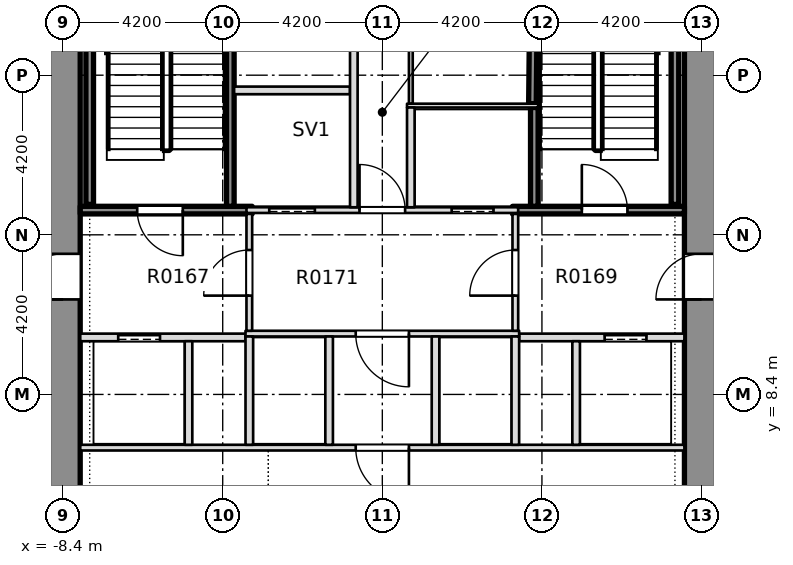
"""IFC4 building model, lengths in metres.
Left out: names, types, materials, properties, quantities, classifications, styles, units other than length and angle.
Written with IfcOpenShell. Run it as: python <this file> out.ifc"""

import sys

from ifc_helpers import new_model, si_unit, direction, frame, frame_2d, origin, place, context, subcontext, project, spatial, rectangle, extrude, element, fill, save


model = new_model("IFC4")
c1 = context("Model", 3, precision=1e-05, world=origin(), true_north=direction((0.0, 1.0)))
c2 = subcontext(c1, "Body", "Model", "MODEL_VIEW")
j1 = project(units=[si_unit("LENGTHUNIT", "METRE"), si_unit("PLANEANGLEUNIT", "RADIAN")], contexts=[c1])
p1 = place(None, origin())
s1 = spatial("IfcSite", under=j1, at=p1, CompositionType="ELEMENT")
p2 = place(p1, origin())
s2 = spatial("IfcBuilding", under=s1, at=p2, CompositionType="ELEMENT")
p3 = place(p2, frame((0.0, 0.0, 7.5)))
s3 = spatial("IfcBuildingStorey", under=s2, at=p3, CompositionType="ELEMENT", Elevation=7.5)
p4 = place(p3, frame((-8.4, -7.5, -0.4), z_axis=(0.0, 0.0, 1.0), x_axis=(0.0, 1.0, 0.0)))
e1 = element("IfcWall", 1, at=p4, inside=s3, PredefinedType="SHEAR", context=c2, shape_type="SweptSolid", body=[
    extrude(rectangle(XDim=28.35, YDim=0.9, at=frame_2d((14.175, 0.0))), origin(), (0.0, 0.0, 1.0), 5.0),
])
p5 = place(p4, frame((18.4, 0.0, 0.4)))
e2 = element("IfcOpeningElement", 2, at=p5, cuts=e1, PredefinedType="OPENING", context=c2, shape_type="SweptSolid", body=[
    extrude(rectangle(XDim=1.2, YDim=2.1, at=frame_2d((0.6, 1.05))), frame((0.0, 0.46, 0.0), z_axis=(0.0, -1.0, 0.0), x_axis=(1.0, 0.0, 0.0)), (0.0, 0.0, 1.0), 0.92),
])
p6 = place(p3, frame((8.4, -7.5, -0.4), z_axis=(0.0, 0.0, 1.0), x_axis=(0.0, 1.0, 0.0)))
e3 = element("IfcWall", 3, at=p6, inside=s3, PredefinedType="SHEAR", context=c2, shape_type="SweptSolid", body=[
    extrude(rectangle(XDim=28.35, YDim=0.9, at=frame_2d((14.175, 0.0))), origin(), (0.0, 0.0, 1.0), 5.0),
])
p7 = place(p6, frame((18.4, 0.0, 0.4)))
e4 = element("IfcOpeningElement", 4, at=p7, cuts=e3, PredefinedType="OPENING", context=c2, shape_type="SweptSolid", body=[
    extrude(rectangle(XDim=1.2, YDim=2.1, at=frame_2d((0.6, 1.05))), frame((0.0, 0.46, 0.0), z_axis=(0.0, -1.0, 0.0), x_axis=(1.0, 0.0, 0.0)), (0.0, 0.0, 1.0), 0.92),
])
p8 = place(p3, frame((-7.949, 7.0, 0.0), z_axis=(0.0, 0.0, 1.0), x_axis=(1.0, 0.0, 0.0)))
e5 = element("IfcWall", 5, at=p8, inside=s3, PredefinedType="PARTITIONING", context=c2, shape_type="SweptSolid", body=[
    extrude(rectangle(XDim=15.898, YDim=0.15, at=frame_2d((7.949, 0.0))), origin(), (0.0, 0.0, 1.0), 4.6),
])
p9 = place(p8, frame((7.249, 0.0, 0.0)))
e6 = element("IfcOpeningElement", 6, at=p9, cuts=e5, PredefinedType="OPENING", context=c2, shape_type="SweptSolid", body=[
    extrude(rectangle(XDim=1.4, YDim=2.1, at=frame_2d((0.7, 1.05))), frame((0.0, 0.085, 0.0), z_axis=(0.0, -1.0, 0.0), x_axis=(1.0, 0.0, 0.0)), (0.0, 0.0, 1.0), 0.17),
])
p10 = place(p3, frame((-7.949, 9.9, 0.0), z_axis=(0.0, 0.0, 1.0), x_axis=(1.0, 0.0, 0.0)))
e7 = element("IfcWall", 7, at=p10, inside=s3, PredefinedType="PARTITIONING", context=c2, shape_type="SweptSolid", body=[
    extrude(rectangle(XDim=4.349, YDim=0.2, at=frame_2d((2.174, 0.0))), origin(), (0.0, 0.0, 1.0), 4.6),
])
p11 = place(p10, frame((0.999, 0.0, 0.0)))
e8 = element("IfcOpeningElement", 8, at=p11, cuts=e7, PredefinedType="OPENING", context=c2, shape_type="SweptSolid", body=[
    extrude(rectangle(XDim=1.1, YDim=2.1, at=frame_2d((0.55, 1.05))), frame((0.0, 0.11, 0.0), z_axis=(0.0, -1.0, 0.0), x_axis=(1.0, 0.0, 0.0)), (0.0, 0.0, 1.0), 0.22),
])
p12 = place(p3, frame((3.6, 9.9, 0.0), z_axis=(0.0, 0.0, 1.0), x_axis=(1.0, 0.0, 0.0)))
e9 = element("IfcWall", 9, at=p12, inside=s3, PredefinedType="PARTITIONING", context=c2, shape_type="SweptSolid", body=[
    extrude(rectangle(XDim=4.349, YDim=0.2, at=frame_2d((2.174, 0.0))), origin(), (0.0, 0.0, 1.0), 4.6),
])
p13 = place(p12, frame((2.25, 0.0, 0.0)))
e10 = element("IfcOpeningElement", 10, at=p13, cuts=e9, PredefinedType="OPENING", context=c2, shape_type="SweptSolid", body=[
    extrude(rectangle(XDim=1.1, YDim=2.1, at=frame_2d((0.55, 1.05))), frame((0.0, 0.11, 0.0), z_axis=(0.0, -1.0, 0.0), x_axis=(1.0, 0.0, 0.0)), (0.0, 0.0, 1.0), 0.22),
])
p14 = place(p3, frame((-3.6, 10.0, 0.0), z_axis=(0.0, 0.0, 1.0), x_axis=(1.0, 0.0, 0.0)))
e11 = element("IfcWall", 11, at=p14, inside=s3, PredefinedType="PARTITIONING", context=c2, shape_type="SweptSolid", body=[
    extrude(rectangle(XDim=7.2, YDim=0.15, at=frame_2d((3.6, 0.0))), origin(), (0.0, 0.0, 1.0), 4.6),
])
p15 = place(p14, frame((2.9, 0.0, 0.0)))
e12 = element("IfcOpeningElement", 12, at=p15, cuts=e11, PredefinedType="OPENING", context=c2, shape_type="SweptSolid", body=[
    extrude(rectangle(XDim=1.4, YDim=2.1, at=frame_2d((0.7, 1.05))), frame((0.0, 0.085, 0.0), z_axis=(0.0, -1.0, 0.0), x_axis=(1.0, 0.0, 0.0)), (0.0, 0.0, 1.0), 0.17),
])
p16 = place(p3, frame((-7.949, 13.25, 0.0), z_axis=(0.0, 0.0, 1.0), x_axis=(1.0, 0.0, 0.0)))
e13 = element("IfcWall", 13, at=p16, inside=s3, PredefinedType="SOLIDWALL", context=c2, shape_type="SweptSolid", body=[
    extrude(rectangle(XDim=4.524, YDim=0.2, at=frame_2d((2.262, 0.0))), origin(), (0.0, 0.0, 1.0), 4.6),
])
p17 = place(p16, frame((1.499, 0.0, 0.0)))
e14 = element("IfcOpeningElement", 14, at=p17, cuts=e13, PredefinedType="OPENING", context=c2, shape_type="SweptSolid", body=[
    extrude(rectangle(XDim=1.2, YDim=2.1, at=frame_2d((0.6, 1.05))), frame((0.0, 0.11, 0.0), z_axis=(0.0, -1.0, 0.0), x_axis=(1.0, 0.0, 0.0)), (0.0, 0.0, 1.0), 0.22),
])
p18 = place(p3, frame((-3.575, 13.25, 0.0), z_axis=(0.0, 0.0, 1.0), x_axis=(1.0, 0.0, 0.0)))
e15 = element("IfcWall", 15, at=p18, inside=s3, PredefinedType="PARTITIONING", context=c2, shape_type="SweptSolid", body=[
    extrude(rectangle(XDim=7.15, YDim=0.15, at=frame_2d((3.575, 0.0))), origin(), (0.0, 0.0, 1.0), 4.6),
])
p19 = place(p18, frame((0.6, 0.0, 0.0)))
e16 = element("IfcOpeningElement", 16, at=p19, cuts=e15, PredefinedType="OPENING", context=c2, shape_type="SweptSolid", body=[
    extrude(rectangle(XDim=1.2, YDim=2.1, at=frame_2d((0.6, 1.05))), frame((0.0, 0.085, 0.0), z_axis=(0.0, -1.0, 0.0), x_axis=(1.0, 0.0, 0.0)), (0.0, 0.0, 1.0), 0.17),
])
p20 = place(p18, frame((5.4, 0.0, 0.0)))
e17 = element("IfcOpeningElement", 17, at=p20, cuts=e15, PredefinedType="OPENING", context=c2, shape_type="SweptSolid", body=[
    extrude(rectangle(XDim=1.1, YDim=2.1, at=frame_2d((0.55, 1.05))), frame((0.0, 0.085, 0.0), z_axis=(0.0, -1.0, 0.0), x_axis=(1.0, 0.0, 0.0)), (0.0, 0.0, 1.0), 0.17),
])
p21 = place(p18, frame((2.975, 0.0, 0.0)))
e18 = element("IfcOpeningElement", 18, at=p21, cuts=e15, PredefinedType="OPENING", context=c2, shape_type="SweptSolid", body=[
    extrude(rectangle(XDim=1.2, YDim=2.1, at=frame_2d((0.6, 1.05))), frame((0.0, 0.085, 0.0), z_axis=(0.0, -1.0, 0.0), x_axis=(1.0, 0.0, 0.0)), (0.0, 0.0, 1.0), 0.17),
])
p22 = place(p3, frame((3.425, 13.25, 0.0), z_axis=(0.0, 0.0, 1.0), x_axis=(1.0, 0.0, 0.0)))
e19 = element("IfcWall", 19, at=p22, inside=s3, PredefinedType="SOLIDWALL", context=c2, shape_type="SweptSolid", body=[
    extrude(rectangle(XDim=4.524, YDim=0.2, at=frame_2d((2.262, 0.0))), origin(), (0.0, 0.0, 1.0), 4.6),
])
p23 = place(p22, frame((1.825, 0.0, 0.0)))
e20 = element("IfcOpeningElement", 20, at=p23, cuts=e19, PredefinedType="OPENING", context=c2, shape_type="SweptSolid", body=[
    extrude(rectangle(XDim=1.2, YDim=2.1, at=frame_2d((0.6, 1.05))), frame((0.0, 0.11, 0.0), z_axis=(0.0, -1.0, 0.0), x_axis=(1.0, 0.0, 0.0)), (0.0, 0.0, 1.0), 0.22),
])
p24 = place(p3, frame((0.65, 16.0, 0.0), z_axis=(0.0, 0.0, 1.0), x_axis=(1.0, 0.0, 0.0)))
e21 = element("IfcWall", 21, at=p24, inside=s3, PredefinedType="PARTITIONING", context=c2, shape_type="SweptSolid", body=[
    extrude(rectangle(XDim=3.45, YDim=0.1, at=frame_2d((1.725, 0.0))), origin(), (0.0, 0.0, 1.0), 4.6),
])
p25 = place(p3, frame((-3.9, 16.4, 0.0), z_axis=(0.0, 0.0, 1.0), x_axis=(1.0, 0.0, 0.0)))
e22 = element("IfcWall", 22, at=p25, inside=s3, PredefinedType="PARTITIONING", context=c2, shape_type="SweptSolid", body=[
    extrude(rectangle(XDim=3.05, YDim=0.2, at=frame_2d((1.525, 0.0))), origin(), (0.0, 0.0, 1.0), 4.6),
])
p26 = place(p3, frame((-5.1, 7.075, 0.0), z_axis=(0.0, 0.0, 1.0), x_axis=(0.0, 1.0, 0.0)))
e23 = element("IfcWall", 23, at=p26, inside=s3, PredefinedType="PARTITIONING", context=c2, shape_type="SweptSolid", body=[
    extrude(rectangle(XDim=2.725, YDim=0.2, at=frame_2d((1.363, 0.0))), origin(), (0.0, 0.0, 1.0), 4.6),
])
p27 = place(p3, frame((-4.0, 13.35, 0.0), z_axis=(0.0, 0.0, 1.0), x_axis=(0.0, 1.0, 0.0)))
e24 = element("IfcWall", 24, at=p27, inside=s3, PredefinedType="SOLIDWALL", context=c2, shape_type="SweptSolid", body=[
    extrude(rectangle(XDim=7.499, YDim=0.2, at=frame_2d((3.75, 0.0))), origin(), (0.0, 0.0, 1.0), 4.6),
])
p28 = place(p3, frame((-3.5, 7.075, 0.0), z_axis=(0.0, 0.0, 1.0), x_axis=(0.0, 1.0, 0.0)))
e25 = element("IfcWall", 25, at=p28, inside=s3, PredefinedType="PARTITIONING", context=c2, shape_type="SweptSolid", body=[
    extrude(rectangle(XDim=2.85, YDim=0.2, at=frame_2d((1.425, 0.0))), origin(), (0.0, 0.0, 1.0), 4.6),
])
p29 = place(p3, frame((-3.5, 10.075, 0.0), z_axis=(0.0, 0.0, 1.0), x_axis=(0.0, 1.0, 0.0)))
e26 = element("IfcWall", 26, at=p29, inside=s3, PredefinedType="PARTITIONING", context=c2, shape_type="SweptSolid", body=[
    extrude(rectangle(XDim=3.075, YDim=0.15, at=frame_2d((1.538, 0.0))), origin(), (0.0, 0.0, 1.0), 4.6),
])
p30 = place(p29, frame((0.925, 0.0, 0.0)))
e27 = element("IfcOpeningElement", 27, at=p30, cuts=e26, PredefinedType="OPENING", context=c2, shape_type="SweptSolid", body=[
    extrude(rectangle(XDim=1.2, YDim=2.1, at=frame_2d((0.6, 1.05))), frame((0.0, 0.085, 0.0), z_axis=(0.0, -1.0, 0.0), x_axis=(1.0, 0.0, 0.0)), (0.0, 0.0, 1.0), 0.17),
])
p31 = place(p3, frame((-1.4, 7.075, 0.0), z_axis=(0.0, 0.0, 1.0), x_axis=(0.0, 1.0, 0.0)))
e28 = element("IfcWall", 28, at=p31, inside=s3, PredefinedType="PARTITIONING", context=c2, shape_type="SweptSolid", body=[
    extrude(rectangle(XDim=2.85, YDim=0.2, at=frame_2d((1.425, 0.0))), origin(), (0.0, 0.0, 1.0), 4.6),
])
p32 = place(p3, frame((-0.75, 13.325, 0.0), z_axis=(0.0, 0.0, 1.0), x_axis=(0.0, 1.0, 0.0)))
e29 = element("IfcWall", 29, at=p32, inside=s3, PredefinedType="PARTITIONING", context=c2, shape_type="SweptSolid", body=[
    extrude(rectangle(XDim=7.524, YDim=0.2, at=frame_2d((3.762, 0.0))), origin(), (0.0, 0.0, 1.0), 4.6),
])
p33 = place(p32, frame((4.8, 0.0, 0.0)))
e30 = element("IfcOpeningElement", 30, at=p33, cuts=e29, PredefinedType="OPENING", context=c2, shape_type="SweptSolid", body=[
    extrude(rectangle(XDim=0.95, YDim=2.1, at=frame_2d((0.475, 1.05))), frame((0.0, 0.11, 0.0), z_axis=(0.0, -1.0, 0.0), x_axis=(1.0, 0.0, 0.0)), (0.0, 0.0, 1.0), 0.22),
])
p34 = place(p3, frame((0.75, 13.325, 0.0), z_axis=(0.0, 0.0, 1.0), x_axis=(0.0, 1.0, 0.0)))
e31 = element("IfcWall", 31, at=p34, inside=s3, PredefinedType="PARTITIONING", context=c2, shape_type="SweptSolid", body=[
    extrude(rectangle(XDim=2.625, YDim=0.2, at=frame_2d((1.312, 0.0))), origin(), (0.0, 0.0, 1.0), 4.6),
])
p35 = place(p3, frame((0.75, 16.05, 0.0), z_axis=(0.0, 0.0, 1.0), x_axis=(0.0, 1.0, 0.0)))
e32 = element("IfcWall", 32, at=p35, inside=s3, PredefinedType="PARTITIONING", context=c2, shape_type="SweptSolid", body=[
    extrude(rectangle(XDim=4.799, YDim=0.1, at=frame_2d((2.399, 0.0))), origin(), (0.0, 0.0, 1.0), 4.6),
])
p36 = place(p35, frame((1.875, 0.0, 0.0)))
e33 = element("IfcOpeningElement", 33, at=p36, cuts=e32, PredefinedType="OPENING", context=c2, shape_type="SweptSolid", body=[
    extrude(rectangle(XDim=0.95, YDim=2.1, at=frame_2d((0.475, 1.05))), frame((0.0, 0.06, 0.0), z_axis=(0.0, -1.0, 0.0), x_axis=(1.0, 0.0, 0.0)), (0.0, 0.0, 1.0), 0.12),
])
for number, where, z_axis, x_axis in (
    (34, (1.4, 7.075, 0.0), (0.0, 0.0, 1.0), (0.0, 1.0, 0.0)),
    (35, (3.5, 7.075, 0.0), (0.0, 0.0, 1.0), (0.0, 1.0, 0.0)),
):
    element("IfcWall", number, at=place(p3, frame(where, z_axis=z_axis, x_axis=x_axis)), inside=s3, PredefinedType="PARTITIONING", context=c2, shape_type="SweptSolid", body=[
        extrude(rectangle(XDim=2.85, YDim=0.2, at=frame_2d((1.425, 0.0))), origin(), (0.0, 0.0, 1.0), 4.6),
    ])
p37 = place(p3, frame((3.5, 10.075, 0.0), z_axis=(0.0, 0.0, 1.0), x_axis=(0.0, 1.0, 0.0)))
e36 = element("IfcWall", 36, at=p37, inside=s3, PredefinedType="PARTITIONING", context=c2, shape_type="SweptSolid", body=[
    extrude(rectangle(XDim=3.075, YDim=0.15, at=frame_2d((1.538, 0.0))), origin(), (0.0, 0.0, 1.0), 4.6),
])
p38 = place(p37, frame((0.925, 0.0, 0.0)))
e37 = element("IfcOpeningElement", 37, at=p38, cuts=e36, PredefinedType="OPENING", context=c2, shape_type="SweptSolid", body=[
    extrude(rectangle(XDim=1.2, YDim=2.1, at=frame_2d((0.6, 1.05))), frame((0.0, 0.085, 0.0), z_axis=(0.0, -1.0, 0.0), x_axis=(1.0, 0.0, 0.0)), (0.0, 0.0, 1.0), 0.17),
])
p39 = place(p3, frame((4.0, 13.35, 0.0), z_axis=(0.0, 0.0, 1.0), x_axis=(0.0, 1.0, 0.0)))
e38 = element("IfcWall", 38, at=p39, inside=s3, PredefinedType="SOLIDWALL", context=c2, shape_type="SweptSolid", body=[
    extrude(rectangle(XDim=2.6, YDim=0.2, at=frame_2d((1.3, 0.0))), origin(), (0.0, 0.0, 1.0), 4.6),
])
p40 = place(p3, frame((3.95, 16.05, 0.0), z_axis=(0.0, 0.0, 1.0), x_axis=(0.010538176883, 0.999944471872, 0.0)))
e39 = element("IfcWall", 39, at=p40, inside=s3, PredefinedType="SOLIDWALL", context=c2, shape_type="SweptSolid", body=[
    extrude(rectangle(XDim=4.749, YDim=0.2, at=frame_2d((2.375, 0.0))), origin(), (0.0, 0.0, 1.0), 4.6),
])
p41 = place(p3, frame((5.1, 7.075, 0.0), z_axis=(0.0, 0.0, 1.0), x_axis=(0.0, 1.0, 0.0)))
e40 = element("IfcWall", 40, at=p41, inside=s3, PredefinedType="PARTITIONING", context=c2, shape_type="SweptSolid", body=[
    extrude(rectangle(XDim=2.725, YDim=0.2, at=frame_2d((1.363, 0.0))), origin(), (0.0, 0.0, 1.0), 4.6),
])
for number, where, z_axis, x_axis in (
    (41, (-7.7, 13.4, 0.0), (0.0, 0.0, 1.0), (0.0, 1.0, 0.0)),
    (42, (7.7, 13.4, 0.0), (0.0, 0.0, 1.0), (0.0, 1.0, 0.0)),
):
    element("IfcWall", number, at=place(p3, frame(where, z_axis=z_axis, x_axis=x_axis)), inside=s3, PredefinedType="SOLIDWALL", context=c2, shape_type="SweptSolid", body=[
        extrude(rectangle(XDim=7.4, YDim=0.2, at=frame_2d((3.7, 0.0))), origin(), (0.0, 0.0, 1.0), 4.6),
    ])
p42 = place(p17, origin())
e43 = element("IfcDoor", 43, at=p42, inside=s3, OperationType="SINGLE_SWING_LEFT", PredefinedType="DOOR", context=c2, shape_type="SweptSolid", body=[
    extrude(rectangle(XDim=1.2, YDim=2.1, at=frame_2d((0.6, 1.05))), frame((0.0, 0.025, 0.0), z_axis=(0.0, -1.0, 0.0), x_axis=(1.0, 0.0, 0.0)), (0.0, 0.0, 1.0), 0.05),
])
fill(e14, e43)
p43 = place(p11, origin())
e44 = element("IfcDoor", 44, at=p43, inside=s3, OperationType="SLIDING_TO_RIGHT", PredefinedType="DOOR", context=c2, shape_type="SweptSolid", body=[
    extrude(rectangle(XDim=1.1, YDim=2.1, at=frame_2d((0.55, 1.05))), frame((0.0, 0.025, 0.0), z_axis=(0.0, -1.0, 0.0), x_axis=(1.0, 0.0, 0.0)), (0.0, 0.0, 1.0), 0.05),
])
fill(e8, e44)
p44 = place(p23, origin())
e45 = element("IfcDoor", 45, at=p44, inside=s3, OperationType="SINGLE_SWING_RIGHT", PredefinedType="DOOR", context=c2, shape_type="SweptSolid", body=[
    extrude(rectangle(XDim=1.2, YDim=2.1, at=frame_2d((0.6, 1.05))), frame((0.0, 0.025, 0.0), z_axis=(0.0, -1.0, 0.0), x_axis=(1.0, 0.0, 0.0)), (0.0, 0.0, 1.0), 0.05),
])
fill(e20, e45)
p45 = place(p13, origin())
e46 = element("IfcDoor", 46, at=p45, inside=s3, OperationType="SLIDING_TO_LEFT", PredefinedType="DOOR", context=c2, shape_type="SweptSolid", body=[
    extrude(rectangle(XDim=1.1, YDim=2.1, at=frame_2d((0.55, 1.05))), frame((0.0, 0.025, 0.0), z_axis=(0.0, -1.0, 0.0), x_axis=(1.0, 0.0, 0.0)), (0.0, 0.0, 1.0), 0.05),
])
fill(e10, e46)
p46 = place(p9, origin())
e47 = element("IfcDoor", 47, at=p46, inside=s3, OperationType="SINGLE_SWING_RIGHT", PredefinedType="DOOR", context=c2, shape_type="SweptSolid", body=[
    extrude(rectangle(XDim=1.4, YDim=2.1, at=frame_2d((0.7, 1.05))), frame((0.0, 0.025, 0.0), z_axis=(0.0, -1.0, 0.0), x_axis=(1.0, 0.0, 0.0)), (0.0, 0.0, 1.0), 0.05),
])
fill(e6, e47)
p47 = place(p15, origin())
e48 = element("IfcDoor", 48, at=p47, inside=s3, OperationType="SINGLE_SWING_RIGHT", PredefinedType="DOOR", context=c2, shape_type="SweptSolid", body=[
    extrude(rectangle(XDim=1.4, YDim=2.1, at=frame_2d((0.7, 1.05))), frame((0.0, 0.025, 0.0), z_axis=(0.0, -1.0, 0.0), x_axis=(1.0, 0.0, 0.0)), (0.0, 0.0, 1.0), 0.05),
])
fill(e12, e48)
p48 = place(p19, origin())
e49 = element("IfcDoor", 49, at=p48, inside=s3, OperationType="SLIDING_TO_RIGHT", PredefinedType="DOOR", context=c2, shape_type="SweptSolid", body=[
    extrude(rectangle(XDim=1.2, YDim=2.1, at=frame_2d((0.6, 1.05))), frame((0.0, 0.025, 0.0), z_axis=(0.0, -1.0, 0.0), x_axis=(1.0, 0.0, 0.0)), (0.0, 0.0, 1.0), 0.05),
])
fill(e16, e49)
p49 = place(p20, origin())
e50 = element("IfcDoor", 50, at=p49, inside=s3, OperationType="SLIDING_TO_LEFT", PredefinedType="DOOR", context=c2, shape_type="SweptSolid", body=[
    extrude(rectangle(XDim=1.1, YDim=2.1, at=frame_2d((0.55, 1.05))), frame((0.0, 0.025, 0.0), z_axis=(0.0, -1.0, 0.0), x_axis=(1.0, 0.0, 0.0)), (0.0, 0.0, 1.0), 0.05),
])
fill(e17, e50)
p50 = place(p21, origin())
e51 = element("IfcDoor", 51, at=p50, inside=s3, OperationType="SINGLE_SWING_RIGHT", PredefinedType="DOOR", context=c2, shape_type="SweptSolid", body=[
    extrude(rectangle(XDim=1.2, YDim=2.1, at=frame_2d((0.6, 1.05))), frame((0.0, 0.025, 0.0), z_axis=(0.0, -1.0, 0.0), x_axis=(1.0, 0.0, 0.0)), (0.0, 0.0, 1.0), 0.05),
])
fill(e18, e51)
p51 = place(p30, origin())
e52 = element("IfcDoor", 52, at=p51, inside=s3, OperationType="SINGLE_SWING_RIGHT", PredefinedType="DOOR", context=c2, shape_type="SweptSolid", body=[
    extrude(rectangle(XDim=1.2, YDim=2.1, at=frame_2d((0.6, 1.05))), frame((0.0, 0.025, 0.0), z_axis=(0.0, -1.0, 0.0), x_axis=(1.0, 0.0, 0.0)), (0.0, 0.0, 1.0), 0.05),
])
fill(e27, e52)
p52 = place(p38, origin())
e53 = element("IfcDoor", 53, at=p52, inside=s3, OperationType="SINGLE_SWING_LEFT", PredefinedType="DOOR", context=c2, shape_type="SweptSolid", body=[
    extrude(rectangle(XDim=1.2, YDim=2.1, at=frame_2d((0.6, 1.05))), frame((0.0, 0.025, 0.0), z_axis=(0.0, -1.0, 0.0), x_axis=(1.0, 0.0, 0.0)), (0.0, 0.0, 1.0), 0.05),
])
fill(e37, e53)
p53 = place(p5, origin())
e54 = element("IfcDoor", 54, at=p53, inside=s3, OperationType="SINGLE_SWING_LEFT", PredefinedType="DOOR", context=c2, shape_type="SweptSolid", body=[
    extrude(rectangle(XDim=1.2, YDim=2.1, at=frame_2d((0.6, 1.05))), frame((0.0, 0.025, 0.0), z_axis=(0.0, -1.0, 0.0), x_axis=(1.0, 0.0, 0.0)), (0.0, 0.0, 1.0), 0.05),
])
fill(e2, e54)
p54 = place(p7, origin())
e55 = element("IfcDoor", 55, at=p54, inside=s3, OperationType="SINGLE_SWING_LEFT", PredefinedType="DOOR", context=c2, shape_type="SweptSolid", body=[
    extrude(rectangle(XDim=1.2, YDim=2.1, at=frame_2d((0.6, 1.05))), frame((0.0, 0.025, 0.0), z_axis=(0.0, -1.0, 0.0), x_axis=(1.0, 0.0, 0.0)), (0.0, 0.0, 1.0), 0.05),
])
fill(e4, e55)
save(model, sys.argv[1])
